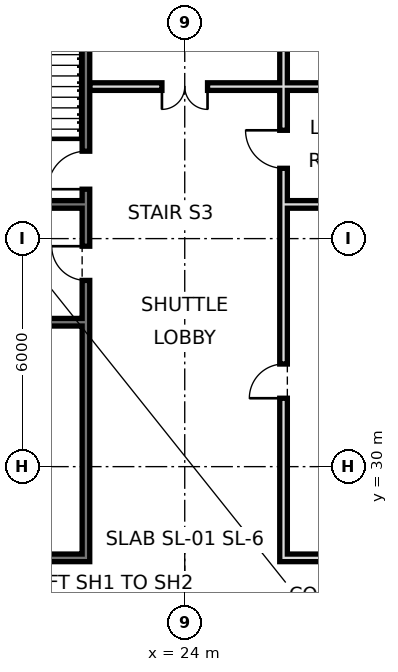
"""IFC4 building model, lengths in metres.
Left out: names, types, materials, properties, quantities, classifications, styles, units other than length and angle.
Written with IfcOpenShell. Run it as: python <this file> out.ifc"""

import sys

from ifc_helpers import new_model, si_unit, direction, frame, frame_2d, origin, place, context, subcontext, project, spatial, rectangle, extrude, element, fill, save


model = new_model("IFC4")
c1 = context("Model", 3, precision=1e-05, world=origin(), true_north=direction((0.0, 1.0)))
c2 = subcontext(c1, "Body", "Model", "MODEL_VIEW")
j1 = project(units=[si_unit("LENGTHUNIT", "METRE"), si_unit("PLANEANGLEUNIT", "RADIAN")], contexts=[c1])
p1 = place(None, origin())
s1 = spatial("IfcSite", under=j1, at=p1, CompositionType="ELEMENT")
p2 = place(p1, origin())
s2 = spatial("IfcBuilding", under=s1, at=p2, CompositionType="ELEMENT")
p3 = place(p2, frame((0.0, 0.0, 44.4)))
s3 = spatial("IfcBuildingStorey", under=s2, at=p3, CompositionType="ELEMENT", Elevation=44.4)
p4 = place(p3, frame((21.4, 27.5, 0.0), z_axis=(0.0, 0.0, 1.0), x_axis=(0.0, 1.0, 0.0)))
e1 = element("IfcWall", 1, at=p4, inside=s3, PredefinedType="SOLIDWALL", context=c2, shape_type="SweptSolid", body=[
    extrude(rectangle(XDim=17.5, YDim=0.2, at=frame_2d((8.75, 0.0))), origin(), (0.0, 0.0, 1.0), 5.22),
])
p5 = place(p4, frame((16.2, 0.0, 0.0)))
e2 = element("IfcOpeningElement", 2, at=p5, cuts=e1, PredefinedType="OPENING", context=c2, shape_type="SweptSolid", body=[
    extrude(rectangle(XDim=1.0, YDim=2.1, at=frame_2d((0.5, 1.05))), frame((0.0, 0.11, 0.0), z_axis=(0.0, -1.0, 0.0), x_axis=(1.0, 0.0, 0.0)), (0.0, 0.0, 1.0), 0.22),
])
p6 = place(p4, frame((9.8, 0.0, 0.0)))
e3 = element("IfcOpeningElement", 3, at=p6, cuts=e1, PredefinedType="OPENING", context=c2, shape_type="SweptSolid", body=[
    extrude(rectangle(XDim=1.0, YDim=2.1, at=frame_2d((0.5, 1.05))), frame((0.0, 0.11, 0.0), z_axis=(0.0, -1.0, 0.0), x_axis=(1.0, 0.0, 0.0)), (0.0, 0.0, 1.0), 0.22),
])
p7 = place(p4, frame((7.4, 0.0, 0.0)))
e4 = element("IfcOpeningElement", 4, at=p7, cuts=e1, PredefinedType="OPENING", context=c2, shape_type="SweptSolid", body=[
    extrude(rectangle(XDim=0.9, YDim=2.1, at=frame_2d((0.45, 1.05))), frame((0.0, 0.11, 0.0), z_axis=(0.0, -1.0, 0.0), x_axis=(1.0, 0.0, 0.0)), (0.0, 0.0, 1.0), 0.22),
])
p8 = place(p3, frame((26.6, 27.5, 0.0), z_axis=(0.0, 0.0, 1.0), x_axis=(0.0, 1.0, 0.0)))
e5 = element("IfcWall", 5, at=p8, inside=s3, PredefinedType="SOLIDWALL", context=c2, shape_type="SweptSolid", body=[
    extrude(rectangle(XDim=17.5, YDim=0.2, at=frame_2d((8.75, 0.0))), origin(), (0.0, 0.0, 1.0), 5.22),
])
p9 = place(p8, frame((4.3, 0.0, 0.0)))
e6 = element("IfcOpeningElement", 6, at=p9, cuts=e5, PredefinedType="OPENING", context=c2, shape_type="SweptSolid", body=[
    extrude(rectangle(XDim=0.9, YDim=2.1, at=frame_2d((0.45, 1.05))), frame((0.0, 0.11, 0.0), z_axis=(0.0, -1.0, 0.0), x_axis=(1.0, 0.0, 0.0)), (0.0, 0.0, 1.0), 0.22),
])
p10 = place(p8, frame((10.35, 0.0, 0.0)))
e7 = element("IfcOpeningElement", 7, at=p10, cuts=e5, PredefinedType="OPENING", context=c2, shape_type="SweptSolid", body=[
    extrude(rectangle(XDim=1.0, YDim=2.1, at=frame_2d((0.5, 1.05))), frame((0.0, 0.11, 0.0), z_axis=(0.0, -1.0, 0.0), x_axis=(1.0, 0.0, 0.0)), (0.0, 0.0, 1.0), 0.22),
])
p11 = place(p8, frame((14.575, 0.0, 0.0)))
e8 = element("IfcOpeningElement", 8, at=p11, cuts=e5, PredefinedType="OPENING", context=c2, shape_type="SweptSolid", body=[
    extrude(rectangle(XDim=1.0, YDim=2.1, at=frame_2d((0.5, 1.05))), frame((0.0, 0.11, 0.0), z_axis=(0.0, -1.0, 0.0), x_axis=(1.0, 0.0, 0.0)), (0.0, 0.0, 1.0), 0.22),
])
for number, where, z_axis, x_axis in (
    (9, (18.6, 27.6, 0.0), (0.0, 0.0, 1.0), (1.0, 0.0, 0.0)),
    (10, (26.7, 27.6, 0.0), (0.0, 0.0, 1.0), (1.0, 0.0, 0.0)),
    (11, (18.6, 33.8, 0.0), (0.0, 0.0, 1.0), (1.0, 0.0, 0.0)),
    (12, (18.6, 36.9, 0.0), (0.0, 0.0, 1.0), (1.0, 0.0, 0.0)),
    (13, (26.7, 36.9, 0.0), (0.0, 0.0, 1.0), (1.0, 0.0, 0.0)),
):
    element("IfcWall", number, at=place(p3, frame(where, z_axis=z_axis, x_axis=x_axis)), inside=s3, PredefinedType="SOLIDWALL", context=c2, shape_type="SweptSolid", body=[
        extrude(rectangle(XDim=2.7, YDim=0.2, at=frame_2d((1.35, 0.0))), origin(), (0.0, 0.0, 1.0), 5.22),
    ])
p12 = place(p3, frame((21.5, 40.0, 0.0), z_axis=(0.0, 0.0, 1.0), x_axis=(1.0, 0.0, 0.0)))
e14 = element("IfcWall", 14, at=p12, inside=s3, PredefinedType="PARTITIONING", context=c2, shape_type="SweptSolid", body=[
    extrude(rectangle(XDim=7.9, YDim=0.2, at=frame_2d((3.95, 0.0))), origin(), (0.0, 0.0, 1.0), 5.22),
])
p13 = place(p12, frame((1.9, 0.0, 0.0)))
e15 = element("IfcOpeningElement", 15, at=p13, cuts=e14, PredefinedType="OPENING", context=c2, shape_type="SweptSolid", body=[
    extrude(rectangle(XDim=1.2, YDim=2.1, at=frame_2d((0.6, 1.05))), frame((0.0, 0.11, 0.0), z_axis=(0.0, -1.0, 0.0), x_axis=(1.0, 0.0, 0.0)), (0.0, 0.0, 1.0), 0.22),
])
p14 = place(p13, frame((1.2, 0.0, 0.0), z_axis=(0.0, 0.0, 1.0), x_axis=(-1.0, 0.0, 0.0)))
e16 = element("IfcDoor", 16, at=p14, inside=s3, OperationType="DOUBLE_DOOR_SINGLE_SWING", PredefinedType="DOOR", context=c2, shape_type="SweptSolid", body=[
    extrude(rectangle(XDim=1.2, YDim=2.1, at=frame_2d((0.6, 1.05))), frame((0.0, 0.025, 0.0), z_axis=(0.0, -1.0, 0.0), x_axis=(1.0, 0.0, 0.0)), (0.0, 0.0, 1.0), 0.05),
])
fill(e15, e16)
p15 = place(p6, origin())
e17 = element("IfcDoor", 17, at=p15, inside=s3, OperationType="SINGLE_SWING_LEFT", PredefinedType="DOOR", context=c2, shape_type="SweptSolid", body=[
    extrude(rectangle(XDim=1.0, YDim=2.1, at=frame_2d((0.5, 1.05))), frame((0.0, 0.025, 0.0), z_axis=(0.0, -1.0, 0.0), x_axis=(1.0, 0.0, 0.0)), (0.0, 0.0, 1.0), 0.05),
])
fill(e3, e17)
p16 = place(p7, frame((0.9, 0.0, 0.0), z_axis=(0.0, 0.0, 1.0), x_axis=(-1.0, 0.0, 0.0)))
e18 = element("IfcDoor", 18, at=p16, inside=s3, OperationType="SINGLE_SWING_LEFT", PredefinedType="DOOR", context=c2, shape_type="SweptSolid", body=[
    extrude(rectangle(XDim=0.9, YDim=2.1, at=frame_2d((0.45, 1.05))), frame((0.0, 0.025, 0.0), z_axis=(0.0, -1.0, 0.0), x_axis=(1.0, 0.0, 0.0)), (0.0, 0.0, 1.0), 0.05),
])
fill(e4, e18)
p17 = place(p9, origin())
e19 = element("IfcDoor", 19, at=p17, inside=s3, OperationType="SINGLE_SWING_LEFT", PredefinedType="DOOR", context=c2, shape_type="SweptSolid", body=[
    extrude(rectangle(XDim=0.9, YDim=2.1, at=frame_2d((0.45, 1.05))), frame((0.0, 0.025, 0.0), z_axis=(0.0, -1.0, 0.0), x_axis=(1.0, 0.0, 0.0)), (0.0, 0.0, 1.0), 0.05),
])
fill(e6, e19)
p18 = place(p10, frame((1.0, 0.0, 0.0), z_axis=(0.0, 0.0, 1.0), x_axis=(-1.0, 0.0, 0.0)))
e20 = element("IfcDoor", 20, at=p18, inside=s3, OperationType="SINGLE_SWING_LEFT", PredefinedType="DOOR", context=c2, shape_type="SweptSolid", body=[
    extrude(rectangle(XDim=1.0, YDim=2.1, at=frame_2d((0.5, 1.05))), frame((0.0, 0.025, 0.0), z_axis=(0.0, -1.0, 0.0), x_axis=(1.0, 0.0, 0.0)), (0.0, 0.0, 1.0), 0.05),
])
fill(e7, e20)
save(model, sys.argv[1])
